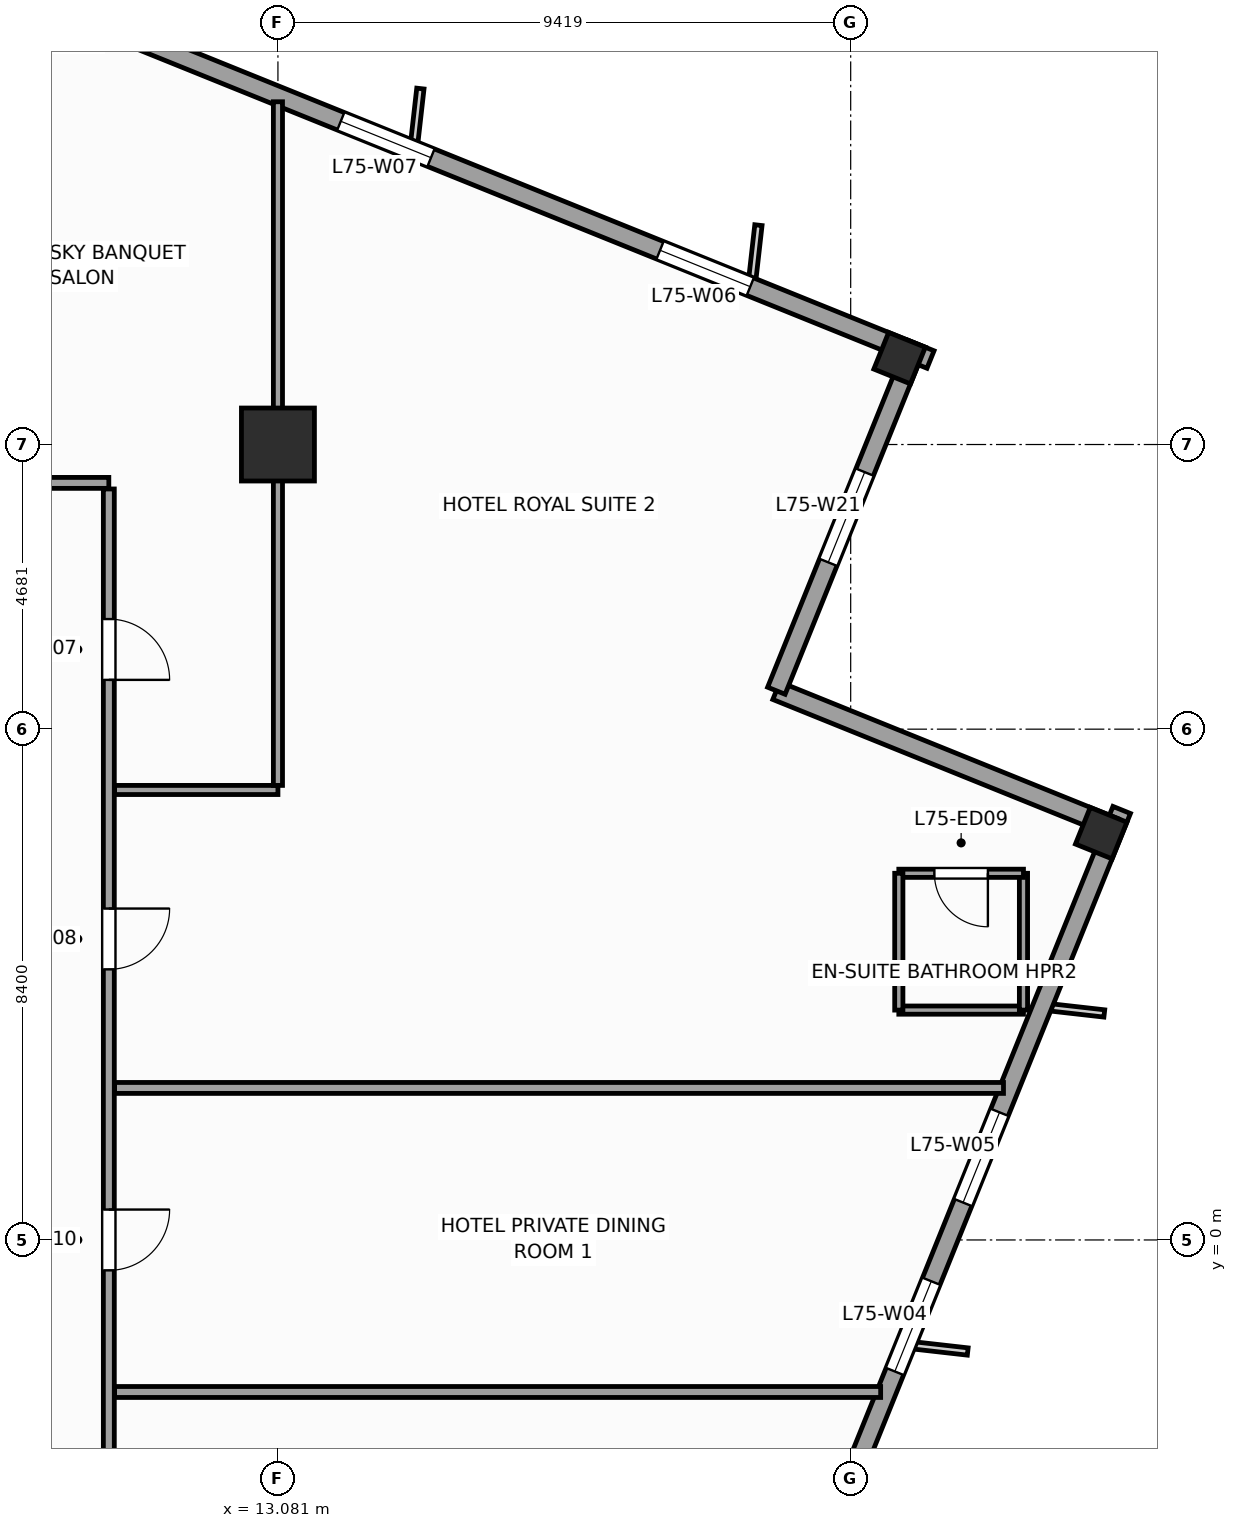
"""IFC4 building model, lengths in metres.
Left out: names, types, materials, properties, quantities, classifications, styles, units other than length and angle.
Written with IfcOpenShell. Run it as: python <this file> out.ifc"""

import sys

from ifc_helpers import new_model, si_unit, direction, frame, frame_2d, origin, origin_2d, place, context, subcontext, project, spatial, rectangle, extrude, source, transform, mapped, element, fill, save


model = new_model("IFC4")
c1 = context("Model", 3, precision=1e-05, world=origin(), true_north=direction((0.0, 1.0)))
c2 = subcontext(c1, "Body", "Model", "MODEL_VIEW")
j1 = project(units=[si_unit("LENGTHUNIT", "METRE"), si_unit("PLANEANGLEUNIT", "RADIAN")], contexts=[c1])
p1 = place(None, origin())
s1 = spatial("IfcSite", under=j1, at=p1, CompositionType="ELEMENT")
p2 = place(p1, origin())
s2 = spatial("IfcBuilding", under=s1, at=p2, CompositionType="ELEMENT")
p3 = place(p2, frame((0.0, 0.0, 304.8)))
s3 = spatial("IfcBuildingStorey", under=s2, at=p3, CompositionType="ELEMENT", Elevation=304.8)
m1 = source(origin(), c2, "Body", "SweptSolid", [
    extrude(rectangle(XDim=1.2, YDim=1.2, at=origin_2d()), origin(), (0.0, 0.0, 1.0), 3.6),
])
p4 = place(p3, frame((13.081, 13.081, 0.0), z_axis=(0.0, 0.0, 1.0), x_axis=(1.0, 0.0, 0.0)))
e1 = element("IfcColumn", 1, at=p4, inside=s3, PredefinedType="COLUMN", context=c2, shape_type="MappedRepresentation", body=[
    mapped(m1, transform((0.0, 0.0, 0.0), scale=1.0)),
])
m2 = source(origin(), c2, "Body", "SweptSolid", [
    extrude(rectangle(XDim=0.65, YDim=0.65, at=origin_2d()), origin(), (0.0, 0.0, 1.0), 3.6),
])
for number, where, z_axis, x_axis in (
    (2, (26.62, 6.69, 0.0), (0.0, 0.0, 1.0), (0.375, 0.927, 0.0)),
    (3, (23.304, 14.501, 0.0), (0.0, 0.0, 1.0), (0.375, 0.927, 0.0)),
):
    element("IfcColumn", number, at=place(p3, frame(where, z_axis=z_axis, x_axis=x_axis)), inside=s3, PredefinedType="COLUMN", context=c2, shape_type="MappedRepresentation", body=[
        mapped(m2, transform((0.0, 0.0, 0.0), scale=1.0)),
    ])
p5 = place(p3, frame((14.479, -23.813, 0.0), z_axis=(0.0, 0.0, 1.0), x_axis=(0.374609557019, 0.927182657188, 0.0)))
e4 = element("IfcWall", 4, at=p5, inside=s3, PredefinedType="STANDARD", context=c2, shape_type="SweptSolid", body=[
    extrude(rectangle(XDim=33.31, YDim=0.31, at=frame_2d((16.655, 0.0))), origin(), (0.0, 0.0, 1.0), 2.75),
])
p6 = place(p5, frame((10.53, 0.0, 0.0)))
e5 = element("IfcOpeningElement", 5, at=p6, cuts=e4, PredefinedType="OPENING", context=c2, shape_type="SweptSolid", body=[
    extrude(rectangle(XDim=1.05, YDim=2.25, at=frame_2d((0.525, 1.125))), frame((0.0, 0.165, 0.0), z_axis=(0.0, -1.0, 0.0), x_axis=(1.0, 0.0, 0.0)), (0.0, 0.0, 1.0), 0.33),
])
p7 = place(p5, frame((3.197, 0.0, 0.47)))
e6 = element("IfcOpeningElement", 6, at=p7, cuts=e4, PredefinedType="OPENING", context=c2, shape_type="SweptSolid", body=[
    extrude(rectangle(XDim=1.6, YDim=2.1, at=frame_2d((0.8, 1.05))), frame((0.0, 0.165, 0.0), z_axis=(0.0, -1.0, 0.0), x_axis=(1.0, 0.0, 0.0)), (0.0, 0.0, 1.0), 0.33),
])
p8 = place(p5, frame((7.36, 0.0, 0.47)))
e7 = element("IfcOpeningElement", 7, at=p8, cuts=e4, PredefinedType="OPENING", context=c2, shape_type="SweptSolid", body=[
    extrude(rectangle(XDim=1.6, YDim=2.1, at=frame_2d((0.8, 1.05))), frame((0.0, 0.165, 0.0), z_axis=(0.0, -1.0, 0.0), x_axis=(1.0, 0.0, 0.0)), (0.0, 0.0, 1.0), 0.33),
])
p9 = place(p5, frame((14.439, 0.0, 0.47)))
e8 = element("IfcOpeningElement", 8, at=p9, cuts=e4, PredefinedType="OPENING", context=c2, shape_type="SweptSolid", body=[
    extrude(rectangle(XDim=1.6, YDim=2.1, at=frame_2d((0.8, 1.05))), frame((0.0, 0.165, 0.0), z_axis=(0.0, -1.0, 0.0), x_axis=(1.0, 0.0, 0.0)), (0.0, 0.0, 1.0), 0.33),
])
p10 = place(p5, frame((23.351, 0.0, 0.47)))
e9 = element("IfcOpeningElement", 9, at=p10, cuts=e4, PredefinedType="OPENING", context=c2, shape_type="SweptSolid", body=[
    extrude(rectangle(XDim=1.6, YDim=2.1, at=frame_2d((0.8, 1.05))), frame((0.0, 0.165, 0.0), z_axis=(0.0, -1.0, 0.0), x_axis=(1.0, 0.0, 0.0)), (0.0, 0.0, 1.0), 0.33),
])
p11 = place(p5, frame((26.347, 0.0, 0.47)))
e10 = element("IfcOpeningElement", 10, at=p11, cuts=e4, PredefinedType="OPENING", context=c2, shape_type="SweptSolid", body=[
    extrude(rectangle(XDim=1.6, YDim=2.1, at=frame_2d((0.8, 1.05))), frame((0.0, 0.165, 0.0), z_axis=(0.0, -1.0, 0.0), x_axis=(1.0, 0.0, 0.0)), (0.0, 0.0, 1.0), 0.33),
])
p12 = place(p3, frame((26.841, 6.784, 0.0), z_axis=(0.0, 0.0, 1.0), x_axis=(-0.927171722085, 0.374636620962, 0.0)))
e11 = element("IfcWall", 11, at=p12, inside=s3, PredefinedType="STANDARD", context=c2, shape_type="SweptSolid", body=[
    extrude(rectangle(XDim=6.0, YDim=0.31, at=frame_2d((3.0, 0.0))), origin(), (0.0, 0.0, 1.0), 2.65),
])
p13 = place(p3, frame((21.278, 9.032, 0.0), z_axis=(0.0, 0.0, 1.0), x_axis=(0.374602739196, 0.927185411764, 0.0)))
e12 = element("IfcWall", 12, at=p13, inside=s3, PredefinedType="STANDARD", context=c2, shape_type="SweptSolid", body=[
    extrude(rectangle(XDim=6.155, YDim=0.31, at=frame_2d((3.078, 0.0))), origin(), (0.0, 0.0, 1.0), 3.35),
])
p14 = place(p13, frame((2.278, 0.0, 0.47)))
e13 = element("IfcOpeningElement", 13, at=p14, cuts=e12, PredefinedType="OPENING", context=c2, shape_type="SweptSolid", body=[
    extrude(rectangle(XDim=1.6, YDim=2.1, at=frame_2d((0.8, 1.05))), frame((0.0, 0.165, 0.0), z_axis=(0.0, -1.0, 0.0), x_axis=(1.0, 0.0, 0.0)), (0.0, 0.0, 1.0), 0.33),
])
p15 = place(p3, frame((23.813, 14.479, 0.0), z_axis=(0.0, 0.0, 1.0), x_axis=(-0.927182657188, 0.374609557019, 0.0)))
e14 = element("IfcWall", 14, at=p15, inside=s3, PredefinedType="STANDARD", context=c2, shape_type="SweptSolid", body=[
    extrude(rectangle(XDim=33.31, YDim=0.31, at=frame_2d((16.655, 0.0))), origin(), (0.0, 0.0, 1.0), 2.75),
])
p16 = place(p15, frame((3.197, 0.0, 0.47)))
e15 = element("IfcOpeningElement", 15, at=p16, cuts=e14, PredefinedType="OPENING", context=c2, shape_type="SweptSolid", body=[
    extrude(rectangle(XDim=1.6, YDim=2.1, at=frame_2d((0.8, 1.05))), frame((0.0, 0.165, 0.0), z_axis=(0.0, -1.0, 0.0), x_axis=(1.0, 0.0, 0.0)), (0.0, 0.0, 1.0), 0.33),
])
p17 = place(p15, frame((8.86, 0.0, 0.47)))
e16 = element("IfcOpeningElement", 16, at=p17, cuts=e14, PredefinedType="OPENING", context=c2, shape_type="SweptSolid", body=[
    extrude(rectangle(XDim=1.6, YDim=2.1, at=frame_2d((0.8, 1.05))), frame((0.0, 0.165, 0.0), z_axis=(0.0, -1.0, 0.0), x_axis=(1.0, 0.0, 0.0)), (0.0, 0.0, 1.0), 0.33),
])
p18 = place(p15, frame((14.439, 0.0, 0.47)))
e17 = element("IfcOpeningElement", 17, at=p18, cuts=e14, PredefinedType="OPENING", context=c2, shape_type="SweptSolid", body=[
    extrude(rectangle(XDim=1.6, YDim=2.1, at=frame_2d((0.8, 1.05))), frame((0.0, 0.165, 0.0), z_axis=(0.0, -1.0, 0.0), x_axis=(1.0, 0.0, 0.0)), (0.0, 0.0, 1.0), 0.33),
])
p19 = place(p15, frame((22.601, 0.0, 0.47)))
e18 = element("IfcOpeningElement", 18, at=p19, cuts=e14, PredefinedType="OPENING", context=c2, shape_type="SweptSolid", body=[
    extrude(rectangle(XDim=1.6, YDim=2.1, at=frame_2d((0.8, 1.05))), frame((0.0, 0.165, 0.0), z_axis=(0.0, -1.0, 0.0), x_axis=(1.0, 0.0, 0.0)), (0.0, 0.0, 1.0), 0.33),
])
p20 = place(p15, frame((29.347, 0.0, 0.47)))
e19 = element("IfcOpeningElement", 19, at=p20, cuts=e14, PredefinedType="OPENING", context=c2, shape_type="SweptSolid", body=[
    extrude(rectangle(XDim=1.6, YDim=2.1, at=frame_2d((0.8, 1.05))), frame((0.0, 0.165, 0.0), z_axis=(0.0, -1.0, 0.0), x_axis=(1.0, 0.0, 0.0)), (0.0, 0.0, 1.0), 0.33),
])
p21 = place(p3, frame((-10.3, 12.45, 0.0), z_axis=(0.0, 0.0, 1.0), x_axis=(1.0, 0.0, 0.0)))
e20 = element("IfcWall", 20, at=p21, inside=s3, PredefinedType="PARTITIONING", context=c2, shape_type="SweptSolid", body=[
    extrude(rectangle(XDim=20.6, YDim=0.18, at=frame_2d((10.3, 0.0))), origin(), (0.0, 0.0, 1.0), 3.35),
])
p22 = place(p21, frame((15.036, 0.0, 0.0)))
e21 = element("IfcOpeningElement", 21, at=p22, cuts=e20, PredefinedType="OPENING", context=c2, shape_type="SweptSolid", body=[
    extrude(rectangle(XDim=0.95, YDim=2.1, at=frame_2d((0.475, 1.05))), frame((0.0, 0.1, 0.0), z_axis=(0.0, -1.0, 0.0), x_axis=(1.0, 0.0, 0.0)), (0.0, 0.0, 1.0), 0.2),
])
p23 = place(p21, frame((3.314, 0.0, 0.0)))
e22 = element("IfcOpeningElement", 22, at=p23, cuts=e20, PredefinedType="OPENING", context=c2, shape_type="SweptSolid", body=[
    extrude(rectangle(XDim=1.0, YDim=2.15, at=frame_2d((0.5, 1.075))), frame((0.0, 0.1, 0.0), z_axis=(0.0, -1.0, 0.0), x_axis=(1.0, 0.0, 0.0)), (0.0, 0.0, 1.0), 0.2),
])
p24 = place(p21, frame((10.05, 0.0, 0.0)))
e23 = element("IfcOpeningElement", 23, at=p24, cuts=e20, PredefinedType="OPENING", context=c2, shape_type="SweptSolid", body=[
    extrude(rectangle(XDim=1.0, YDim=2.15, at=frame_2d((0.5, 1.075))), frame((0.0, 0.1, 0.0), z_axis=(0.0, -1.0, 0.0), x_axis=(1.0, 0.0, 0.0)), (0.0, 0.0, 1.0), 0.2),
])
p25 = place(p3, frame((10.3, -12.35, 0.0), z_axis=(0.0, 0.0, 1.0), x_axis=(0.0, 1.0, 0.0)))
e24 = element("IfcWall", 24, at=p25, inside=s3, PredefinedType="PARTITIONING", context=c2, shape_type="SweptSolid", body=[
    extrude(rectangle(XDim=24.7, YDim=0.18, at=frame_2d((12.35, 0.0))), origin(), (0.0, 0.0, 1.0), 3.35),
])
p26 = place(p25, frame((21.561, 0.0, 0.0)))
e25 = element("IfcOpeningElement", 25, at=p26, cuts=e24, PredefinedType="OPENING", context=c2, shape_type="SweptSolid", body=[
    extrude(rectangle(XDim=1.0, YDim=2.15, at=frame_2d((0.5, 1.075))), frame((0.0, 0.1, 0.0), z_axis=(0.0, -1.0, 0.0), x_axis=(1.0, 0.0, 0.0)), (0.0, 0.0, 1.0), 0.2),
])
p27 = place(p25, frame((16.8, 0.0, 0.0)))
e26 = element("IfcOpeningElement", 26, at=p27, cuts=e24, PredefinedType="OPENING", context=c2, shape_type="SweptSolid", body=[
    extrude(rectangle(XDim=1.0, YDim=2.15, at=frame_2d((0.5, 1.075))), frame((0.0, 0.1, 0.0), z_axis=(0.0, -1.0, 0.0), x_axis=(1.0, 0.0, 0.0)), (0.0, 0.0, 1.0), 0.2),
])
p28 = place(p25, frame((11.85, 0.0, 0.0)))
e27 = element("IfcOpeningElement", 27, at=p28, cuts=e24, PredefinedType="OPENING", context=c2, shape_type="SweptSolid", body=[
    extrude(rectangle(XDim=1.0, YDim=2.15, at=frame_2d((0.5, 1.075))), frame((0.0, 0.1, 0.0), z_axis=(0.0, -1.0, 0.0), x_axis=(1.0, 0.0, 0.0)), (0.0, 0.0, 1.0), 0.2),
])
p29 = place(p25, frame((6.9, 0.0, 0.0)))
e28 = element("IfcOpeningElement", 28, at=p29, cuts=e24, PredefinedType="OPENING", context=c2, shape_type="SweptSolid", body=[
    extrude(rectangle(XDim=1.0, YDim=2.15, at=frame_2d((0.5, 1.075))), frame((0.0, 0.1, 0.0), z_axis=(0.0, -1.0, 0.0), x_axis=(1.0, 0.0, 0.0)), (0.0, 0.0, 1.0), 0.2),
])
p30 = place(p3, frame((10.395, 2.5, 0.0), z_axis=(0.0, 0.0, 1.0), x_axis=(1.0, 0.0, 0.0)))
e29 = element("IfcWall", 29, at=p30, inside=s3, PredefinedType="PARTITIONING", context=c2, shape_type="SweptSolid", body=[
    extrude(rectangle(XDim=14.618, YDim=0.18, at=frame_2d((7.309, 0.0))), origin(), (0.0, 0.0, 1.0), 3.35),
])
p31 = place(p3, frame((10.395, -2.5, 0.0), z_axis=(0.0, 0.0, 1.0), x_axis=(1.0, 0.0, 0.0)))
e30 = element("IfcWall", 30, at=p31, inside=s3, PredefinedType="PARTITIONING", context=c2, shape_type="SweptSolid", body=[
    extrude(rectangle(XDim=12.598, YDim=0.18, at=frame_2d((6.299, 0.0))), origin(), (0.0, 0.0, 1.0), 3.35),
])
p32 = place(p3, frame((10.395, 7.4, 0.0), z_axis=(0.0, 0.0, 1.0), x_axis=(1.0, 0.0, 0.0)))
e31 = element("IfcWall", 31, at=p32, inside=s3, PredefinedType="PARTITIONING", context=c2, shape_type="SweptSolid", body=[
    extrude(rectangle(XDim=2.686, YDim=0.15, at=frame_2d((1.343, 0.0))), origin(), (0.0, 0.0, 1.0), 3.35),
])
p33 = place(p3, frame((13.081, 7.475, 0.0), z_axis=(0.0, 0.0, 1.0), x_axis=(0.0, 1.0, 0.0)))
e32 = element("IfcWall", 32, at=p33, inside=s3, PredefinedType="PARTITIONING", context=c2, shape_type="SweptSolid", body=[
    extrude(rectangle(XDim=11.243, YDim=0.15, at=frame_2d((5.621, 0.0))), origin(), (0.0, 0.0, 1.0), 2.45),
])
p34 = place(p3, frame((23.292, 3.78, 0.0), z_axis=(0.0, 0.0, 1.0), x_axis=(1.0, 0.0, 0.0)))
e33 = element("IfcWall", 33, at=p34, inside=s3, PredefinedType="PARTITIONING", context=c2, shape_type="SweptSolid", body=[
    extrude(rectangle(XDim=2.05, YDim=0.135, at=frame_2d((1.025, 0.0))), origin(), (0.0, 0.0, 1.0), 3.35),
])
p35 = place(p3, frame((25.342, 3.78, 0.0), z_axis=(0.0, 0.0, 1.0), x_axis=(0.0, 1.0, 0.0)))
e34 = element("IfcWall", 34, at=p35, inside=s3, PredefinedType="PARTITIONING", context=c2, shape_type="SweptSolid", body=[
    extrude(rectangle(XDim=2.25, YDim=0.135, at=frame_2d((1.125, 0.0))), origin(), (0.0, 0.0, 1.0), 2.75),
])
p36 = place(p3, frame((23.292, 6.03, 0.0), z_axis=(0.0, 0.0, 1.0), x_axis=(1.0, 0.0, 0.0)))
e35 = element("IfcWall", 35, at=p36, inside=s3, PredefinedType="PARTITIONING", context=c2, shape_type="SweptSolid", body=[
    extrude(rectangle(XDim=2.05, YDim=0.135, at=frame_2d((1.025, 0.0))), origin(), (0.0, 0.0, 1.0), 3.35),
])
p37 = place(p36, frame((0.585, 0.0, 0.0)))
e36 = element("IfcOpeningElement", 36, at=p37, cuts=e35, PredefinedType="OPENING", context=c2, shape_type="SweptSolid", body=[
    extrude(rectangle(XDim=0.88, YDim=2.1, at=frame_2d((0.44, 1.05))), frame((0.0, 0.078, 0.0), z_axis=(0.0, -1.0, 0.0), x_axis=(1.0, 0.0, 0.0)), (0.0, 0.0, 1.0), 0.155),
])
p38 = place(p3, frame((23.292, 3.78, 0.0), z_axis=(0.0, 0.0, 1.0), x_axis=(0.0, 1.0, 0.0)))
e37 = element("IfcWall", 37, at=p38, inside=s3, PredefinedType="PARTITIONING", context=c2, shape_type="SweptSolid", body=[
    extrude(rectangle(XDim=2.25, YDim=0.135, at=frame_2d((1.125, 0.0))), origin(), (0.0, 0.0, 1.0), 2.95),
])
m3 = source(origin(), c2, "Body", "SweptSolid", [
    extrude(rectangle(XDim=1.6, YDim=2.1, at=frame_2d((0.8, 1.05))), frame((0.0, 0.03, 0.0), z_axis=(0.0, -1.0, 0.0), x_axis=(1.0, 0.0, 0.0)), (0.0, 0.0, 1.0), 0.06),
])
p39 = place(p10, origin())
e38 = element("IfcWindow", 38, at=p39, inside=s3, PartitioningType="SINGLE_PANEL", PredefinedType="WINDOW", context=c2, shape_type="MappedRepresentation", body=[
    mapped(m3, transform((0.0, 0.0, 0.0), scale=1.0)),
])
fill(e9, e38)
p40 = place(p11, origin())
e39 = element("IfcWindow", 39, at=p40, inside=s3, PartitioningType="SINGLE_PANEL", PredefinedType="WINDOW", context=c2, shape_type="MappedRepresentation", body=[
    mapped(m3, transform((0.0, 0.0, 0.0), scale=1.0)),
])
fill(e10, e39)
p41 = place(p16, origin())
e40 = element("IfcWindow", 40, at=p41, inside=s3, PartitioningType="SINGLE_PANEL", PredefinedType="WINDOW", context=c2, shape_type="MappedRepresentation", body=[
    mapped(m3, transform((0.0, 0.0, 0.0), scale=1.0)),
])
fill(e15, e40)
p42 = place(p17, origin())
e41 = element("IfcWindow", 41, at=p42, inside=s3, PartitioningType="SINGLE_PANEL", PredefinedType="WINDOW", context=c2, shape_type="MappedRepresentation", body=[
    mapped(m3, transform((0.0, 0.0, 0.0), scale=1.0)),
])
fill(e16, e41)
p43 = place(p14, origin())
e42 = element("IfcWindow", 42, at=p43, inside=s3, PartitioningType="SINGLE_PANEL", PredefinedType="WINDOW", context=c2, shape_type="MappedRepresentation", body=[
    mapped(m3, transform((0.0, 0.0, 0.0), scale=1.0)),
])
fill(e13, e42)
m4 = source(origin(), c2, "Body", "SweptSolid", [
    extrude(rectangle(XDim=1.0, YDim=2.15, at=frame_2d((0.5, 1.075))), frame((0.0, 0.025, 0.0), z_axis=(0.0, -1.0, 0.0), x_axis=(1.0, 0.0, 0.0)), (0.0, 0.0, 1.0), 0.05),
])
p44 = place(p26, frame((1.0, 0.0, 0.0), z_axis=(0.0, 0.0, 1.0), x_axis=(-1.0, 0.0, 0.0)))
e43 = element("IfcDoor", 43, at=p44, inside=s3, OperationType="SINGLE_SWING_LEFT", PredefinedType="DOOR", context=c2, shape_type="MappedRepresentation", body=[
    mapped(m4, transform((0.0, 0.0, 0.0), scale=1.0)),
])
fill(e25, e43)
p45 = place(p27, frame((1.0, 0.0, 0.0), z_axis=(0.0, 0.0, 1.0), x_axis=(-1.0, 0.0, 0.0)))
e44 = element("IfcDoor", 44, at=p45, inside=s3, OperationType="SINGLE_SWING_RIGHT", PredefinedType="DOOR", context=c2, shape_type="MappedRepresentation", body=[
    mapped(m4, transform((0.0, 0.0, 0.0), scale=1.0)),
])
fill(e26, e44)
m5 = source(origin(), c2, "Body", "SweptSolid", [
    extrude(rectangle(XDim=0.88, YDim=2.1, at=frame_2d((0.44, 1.05))), frame((0.0, 0.025, 0.0), z_axis=(0.0, -1.0, 0.0), x_axis=(1.0, 0.0, 0.0)), (0.0, 0.0, 1.0), 0.05),
])
p46 = place(p37, frame((0.88, 0.0, 0.0), z_axis=(0.0, 0.0, 1.0), x_axis=(-1.0, 0.0, 0.0)))
e45 = element("IfcDoor", 45, at=p46, inside=s3, OperationType="SINGLE_SWING_RIGHT", PredefinedType="DOOR", context=c2, shape_type="MappedRepresentation", body=[
    mapped(m5, transform((0.0, 0.0, 0.0), scale=1.0)),
])
fill(e36, e45)
p47 = place(p28, frame((1.0, 0.0, 0.0), z_axis=(0.0, 0.0, 1.0), x_axis=(-1.0, 0.0, 0.0)))
e46 = element("IfcDoor", 46, at=p47, inside=s3, OperationType="SINGLE_SWING_RIGHT", PredefinedType="DOOR", context=c2, shape_type="MappedRepresentation", body=[
    mapped(m4, transform((0.0, 0.0, 0.0), scale=1.0)),
])
fill(e27, e46)
save(model, sys.argv[1])
